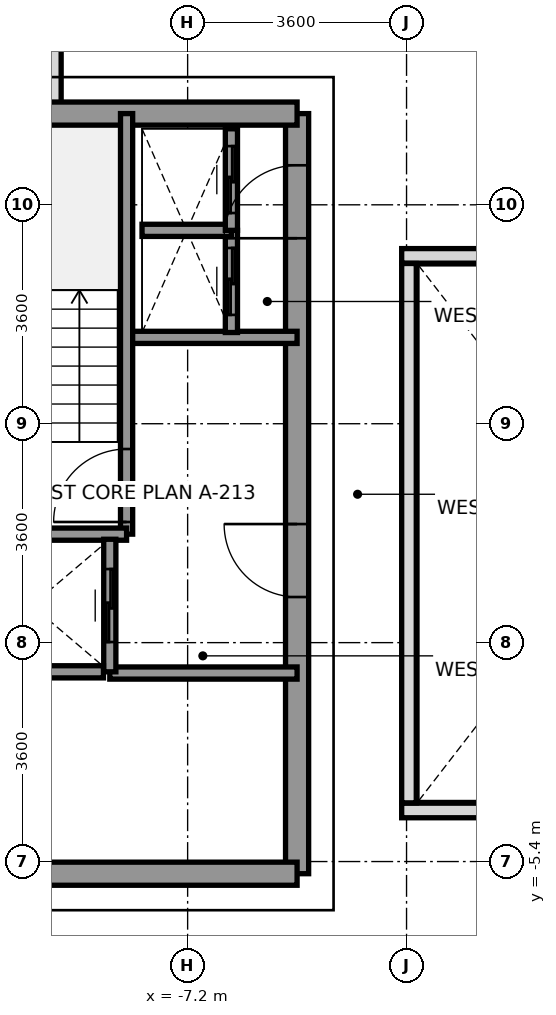
"""IFC4 building model, lengths in metres.
Left out: names, types, materials, properties, quantities, classifications, styles, units other than length and angle.
Written with IfcOpenShell. Run it as: python <this file> out.ifc"""

import sys

from ifc_helpers import new_model, si_unit, direction, frame, frame_2d, origin, place, context, subcontext, project, spatial, rectangle, extrude, source, transform, mapped, element, fill, save


model = new_model("IFC4")
c1 = context("Model", 3, precision=1e-05, world=origin(), true_north=direction((0.0, 1.0)))
c2 = subcontext(c1, "Body", "Model", "MODEL_VIEW")
j1 = project(units=[si_unit("LENGTHUNIT", "METRE"), si_unit("PLANEANGLEUNIT", "RADIAN")], contexts=[c1])
p1 = place(None, origin())
s1 = spatial("IfcSite", under=j1, at=p1, CompositionType="ELEMENT")
p2 = place(p1, origin())
s2 = spatial("IfcBuilding", under=s1, at=p2, CompositionType="ELEMENT")
p3 = place(p2, frame((0.0, 0.0, 201.2)))
s3 = spatial("IfcBuildingStorey", under=s2, at=p3, CompositionType="ELEMENT", Elevation=201.2)
p4 = place(p3, frame((-9.4, 6.953, 0.0), z_axis=(0.0, 0.0, 1.0), x_axis=(0.0, 1.0, 0.0)))
e1 = element("IfcWall", 1, at=p4, inside=s3, PredefinedType="PARAPET", context=c2, shape_type="SweptSolid", body=[
    extrude(rectangle(XDim=1.594, YDim=0.24, at=frame_2d((0.797, 0.0))), origin(), (0.0, 0.0, 1.0), 1.15),
])
p5 = place(p3, frame((-5.4, -5.6, 0.0), z_axis=(0.0, 0.0, 1.0), x_axis=(0.0, 1.0, 0.0)))
e2 = element("IfcWall", 2, at=p5, inside=s3, PredefinedType="SHEAR", context=c2, shape_type="SweptSolid", body=[
    extrude(rectangle(XDim=12.5, YDim=0.38, at=frame_2d((6.25, 0.0))), origin(), (0.0, 0.0, 1.0), 3.2),
])
p6 = place(p5, frame((4.55, 0.0, 0.0)))
e3 = element("IfcOpeningElement", 3, at=p6, cuts=e2, PredefinedType="OPENING", context=c2, shape_type="SweptSolid", body=[
    extrude(rectangle(XDim=1.2, YDim=2.2, at=frame_2d((0.6, 1.1))), frame((0.0, 0.2, 0.0), z_axis=(0.0, -1.0, 0.0), x_axis=(1.0, 0.0, 0.0)), (0.0, 0.0, 1.0), 0.4),
])
p7 = place(p5, frame((10.45, 0.0, 0.0)))
e4 = element("IfcOpeningElement", 4, at=p7, cuts=e2, PredefinedType="OPENING", context=c2, shape_type="SweptSolid", body=[
    extrude(rectangle(XDim=1.2, YDim=2.2, at=frame_2d((0.6, 1.1))), frame((0.0, 0.2, 0.0), z_axis=(0.0, -1.0, 0.0), x_axis=(1.0, 0.0, 0.0)), (0.0, 0.0, 1.0), 0.4),
])
p8 = place(p3, frame((-11.356, 6.9, 0.0), z_axis=(0.0, 0.0, 1.0), x_axis=(1.0, 0.0, 0.0)))
e5 = element("IfcWall", 5, at=p8, inside=s3, PredefinedType="SHEAR", context=c2, shape_type="SweptSolid", body=[
    extrude(rectangle(XDim=5.956, YDim=0.38, at=frame_2d((2.978, 0.0))), origin(), (0.0, 0.0, 1.0), 3.2),
])
p9 = place(p3, frame((-13.2, -5.6, 0.0), z_axis=(0.0, 0.0, 1.0), x_axis=(1.0, 0.0, 0.0)))
e6 = element("IfcWall", 6, at=p9, inside=s3, PredefinedType="SHEAR", context=c2, shape_type="SweptSolid", body=[
    extrude(rectangle(XDim=7.8, YDim=0.38, at=frame_2d((3.9, 0.0))), origin(), (0.0, 0.0, 1.0), 3.2),
])
p10 = place(p3, frame((-8.18, 3.22, 0.0), z_axis=(0.0, 0.0, 1.0), x_axis=(1.0, 0.0, 0.0)))
e7 = element("IfcWall", 7, at=p10, inside=s3, PredefinedType="SOLIDWALL", context=c2, shape_type="SweptSolid", body=[
    extrude(rectangle(XDim=2.78, YDim=0.2, at=frame_2d((1.39, 0.0))), origin(), (0.0, 0.0, 1.0), 3.2),
])
p11 = place(p3, frame((-8.48, -2.3, 0.0), z_axis=(0.0, 0.0, 1.0), x_axis=(1.0, 0.0, 0.0)))
e8 = element("IfcWall", 8, at=p11, inside=s3, PredefinedType="SOLIDWALL", context=c2, shape_type="SweptSolid", body=[
    extrude(rectangle(XDim=3.08, YDim=0.2, at=frame_2d((1.54, 0.0))), origin(), (0.0, 0.0, 1.0), 3.2),
])
p12 = place(p3, frame((-8.204, -0.016, 0.0), z_axis=(0.0, 0.0, 1.0), x_axis=(0.0, 1.0, 0.0)))
e9 = element("IfcWall", 9, at=p12, inside=s3, PredefinedType="SOLIDWALL", context=c2, shape_type="SweptSolid", body=[
    extrude(rectangle(XDim=6.916, YDim=0.2, at=frame_2d((3.458, 0.0))), origin(), (0.0, 0.0, 1.0), 3.2),
])
p13 = place(p12, frame((0.2, 0.0, 0.0)))
e10 = element("IfcOpeningElement", 10, at=p13, cuts=e9, PredefinedType="OPENING", context=c2, shape_type="SweptSolid", body=[
    extrude(rectangle(XDim=1.2, YDim=2.2, at=frame_2d((0.6, 1.1))), frame((0.0, 0.11, 0.0), z_axis=(0.0, -1.0, 0.0), x_axis=(1.0, 0.0, 0.0)), (0.0, 0.0, 1.0), 0.22),
])
p14 = place(p3, frame((-11.356, -0.016, 0.0), z_axis=(0.0, 0.0, 1.0), x_axis=(1.0, 0.0, 0.0)))
e11 = element("IfcWall", 11, at=p14, inside=s3, PredefinedType="SOLIDWALL", context=c2, shape_type="SweptSolid", body=[
    extrude(rectangle(XDim=3.152, YDim=0.2, at=frame_2d((1.576, 0.0))), origin(), (0.0, 0.0, 1.0), 3.2),
])
p15 = place(p3, frame((-8.48, -2.28, 0.0), z_axis=(0.0, 0.0, 1.0), x_axis=(0.0, 1.0, 0.0)))
e12 = element("IfcWall", 12, at=p15, inside=s3, PredefinedType="SOLIDWALL", context=c2, shape_type="SweptSolid", body=[
    extrude(rectangle(XDim=2.18, YDim=0.2, at=frame_2d((1.09, 0.0))), origin(), (0.0, 0.0, 1.0), 3.2),
])
p16 = place(p15, frame((0.49, 0.0, 0.0)))
e13 = element("IfcOpeningElement", 13, at=p16, cuts=e12, PredefinedType="OPENING", context=c2, shape_type="SweptSolid", body=[
    extrude(rectangle(XDim=1.2, YDim=2.2, at=frame_2d((0.6, 1.1))), frame((0.0, 0.11, 0.0), z_axis=(0.0, -1.0, 0.0), x_axis=(1.0, 0.0, 0.0)), (0.0, 0.0, 1.0), 0.22),
])
p17 = place(p3, frame((-10.946, -2.28, 0.0), z_axis=(0.0, 0.0, 1.0), x_axis=(1.0, 0.0, 0.0)))
e14 = element("IfcWall", 14, at=p17, inside=s3, PredefinedType="SOLIDWALL", context=c2, shape_type="SweptSolid", body=[
    extrude(rectangle(XDim=2.362, YDim=0.2, at=frame_2d((1.181, 0.0))), origin(), (0.0, 0.0, 1.0), 3.2),
])
p18 = place(p3, frame((-6.48, 3.3, 0.0), z_axis=(0.0, 0.0, 1.0), x_axis=(0.0, 1.0, 0.0)))
e15 = element("IfcWall", 15, at=p18, inside=s3, PredefinedType="SOLIDWALL", context=c2, shape_type="SweptSolid", body=[
    extrude(rectangle(XDim=1.68, YDim=0.2, at=frame_2d((0.84, 0.0))), origin(), (0.0, 0.0, 1.0), 3.2),
])
p19 = place(p18, frame((0.29, 0.0, 0.0)))
e16 = element("IfcOpeningElement", 16, at=p19, cuts=e15, PredefinedType="OPENING", context=c2, shape_type="SweptSolid", body=[
    extrude(rectangle(XDim=1.1, YDim=2.2, at=frame_2d((0.55, 1.1))), frame((0.0, 0.11, 0.0), z_axis=(0.0, -1.0, 0.0), x_axis=(1.0, 0.0, 0.0)), (0.0, 0.0, 1.0), 0.22),
])
p20 = place(p3, frame((-7.95, 4.98, 0.0), z_axis=(0.0, 0.0, 1.0), x_axis=(1.0, 0.0, 0.0)))
e17 = element("IfcWall", 17, at=p20, inside=s3, PredefinedType="SOLIDWALL", context=c2, shape_type="SweptSolid", body=[
    extrude(rectangle(XDim=1.47, YDim=0.2, at=frame_2d((0.735, 0.0))), origin(), (0.0, 0.0, 1.0), 3.2),
])
p21 = place(p3, frame((-6.48, 4.98, 0.0), z_axis=(0.0, 0.0, 1.0), x_axis=(0.0, 1.0, 0.0)))
e18 = element("IfcWall", 18, at=p21, inside=s3, PredefinedType="SOLIDWALL", context=c2, shape_type="SweptSolid", body=[
    extrude(rectangle(XDim=1.67, YDim=0.2, at=frame_2d((0.835, 0.0))), origin(), (0.0, 0.0, 1.0), 3.2),
])
p22 = place(p21, frame((0.285, 0.0, 0.0)))
e19 = element("IfcOpeningElement", 19, at=p22, cuts=e18, PredefinedType="OPENING", context=c2, shape_type="SweptSolid", body=[
    extrude(rectangle(XDim=1.1, YDim=2.2, at=frame_2d((0.55, 1.1))), frame((0.0, 0.11, 0.0), z_axis=(0.0, -1.0, 0.0), x_axis=(1.0, 0.0, 0.0)), (0.0, 0.0, 1.0), 0.22),
])
for number, where, z_axis, x_axis in (
    (20, (-3.68, -4.56, 0.0), (0.0, 0.0, 1.0), (1.0, 0.0, 0.0)),
    (21, (-3.68, 4.56, 0.0), (0.0, 0.0, 1.0), (1.0, 0.0, 0.0)),
):
    element("IfcWall", number, at=place(p3, frame(where, z_axis=z_axis, x_axis=x_axis)), inside=s3, PredefinedType="PARAPET", context=c2, shape_type="SweptSolid", body=[
        extrude(rectangle(XDim=7.36, YDim=0.24, at=frame_2d((3.68, 0.0))), origin(), (0.0, 0.0, 1.0), 1.15),
    ])
p23 = place(p3, frame((-3.56, -4.435, 0.0), z_axis=(0.0, 0.0, 1.0), x_axis=(0.0, 1.0, 0.0)))
e22 = element("IfcWall", 22, at=p23, inside=s3, PredefinedType="PARAPET", context=c2, shape_type="SweptSolid", body=[
    extrude(rectangle(XDim=8.87, YDim=0.24, at=frame_2d((4.435, 0.0))), origin(), (0.0, 0.0, 1.0), 1.15),
])
m1 = source(origin(), c2, "Body", "SweptSolid", [
    extrude(rectangle(XDim=1.2, YDim=2.2, at=frame_2d((0.6, 1.1))), frame((0.0, 0.025, 0.0), z_axis=(0.0, -1.0, 0.0), x_axis=(1.0, 0.0, 0.0)), (0.0, 0.0, 1.0), 0.05),
])
p24 = place(p13, origin())
e23 = element("IfcDoor", 23, at=p24, inside=s3, OperationType="SINGLE_SWING_LEFT", PredefinedType="DOOR", context=c2, shape_type="MappedRepresentation", body=[
    mapped(m1, transform((0.0, 0.0, 0.0), x_axis=(1.0, 0.0, 0.0), y_axis=(0.0, 1.0, 0.0), z_axis=(0.0, 0.0, 1.0), scale=1.0)),
])
fill(e10, e23)
p25 = place(p6, origin())
e24 = element("IfcDoor", 24, at=p25, inside=s3, OperationType="SINGLE_SWING_RIGHT", PredefinedType="DOOR", context=c2, shape_type="MappedRepresentation", body=[
    mapped(m1, transform((0.0, 0.0, 0.0), x_axis=(1.0, 0.0, 0.0), y_axis=(0.0, 1.0, 0.0), z_axis=(0.0, 0.0, 1.0), scale=1.0)),
])
fill(e3, e24)
p26 = place(p7, origin())
e25 = element("IfcDoor", 25, at=p26, inside=s3, OperationType="SINGLE_SWING_LEFT", PredefinedType="DOOR", context=c2, shape_type="MappedRepresentation", body=[
    mapped(m1, transform((0.0, 0.0, 0.0), x_axis=(1.0, 0.0, 0.0), y_axis=(0.0, 1.0, 0.0), z_axis=(0.0, 0.0, 1.0), scale=1.0)),
])
fill(e4, e25)
p27 = place(p16, origin())
e26 = element("IfcDoor", 26, at=p27, inside=s3, OperationType="SLIDING_TO_RIGHT", PredefinedType="DOOR", context=c2, shape_type="MappedRepresentation", body=[
    mapped(m1, transform((0.0, 0.0, 0.0), x_axis=(1.0, 0.0, 0.0), y_axis=(0.0, 1.0, 0.0), z_axis=(0.0, 0.0, 1.0), scale=1.0)),
])
fill(e13, e26)
m2 = source(origin(), c2, "Body", "SweptSolid", [
    extrude(rectangle(XDim=1.1, YDim=2.2, at=frame_2d((0.55, 1.1))), frame((0.0, 0.025, 0.0), z_axis=(0.0, -1.0, 0.0), x_axis=(1.0, 0.0, 0.0)), (0.0, 0.0, 1.0), 0.05),
])
p28 = place(p19, origin())
e27 = element("IfcDoor", 27, at=p28, inside=s3, OperationType="SLIDING_TO_LEFT", PredefinedType="DOOR", context=c2, shape_type="MappedRepresentation", body=[
    mapped(m2, transform((0.0, 0.0, 0.0), x_axis=(1.0, 0.0, 0.0), y_axis=(0.0, 1.0, 0.0), z_axis=(0.0, 0.0, 1.0), scale=1.0)),
])
fill(e16, e27)
p29 = place(p22, origin())
e28 = element("IfcDoor", 28, at=p29, inside=s3, OperationType="SLIDING_TO_LEFT", PredefinedType="DOOR", context=c2, shape_type="MappedRepresentation", body=[
    mapped(m2, transform((0.0, 0.0, 0.0), x_axis=(1.0, 0.0, 0.0), y_axis=(0.0, 1.0, 0.0), z_axis=(0.0, 0.0, 1.0), scale=1.0)),
])
fill(e19, e28)
save(model, sys.argv[1])
